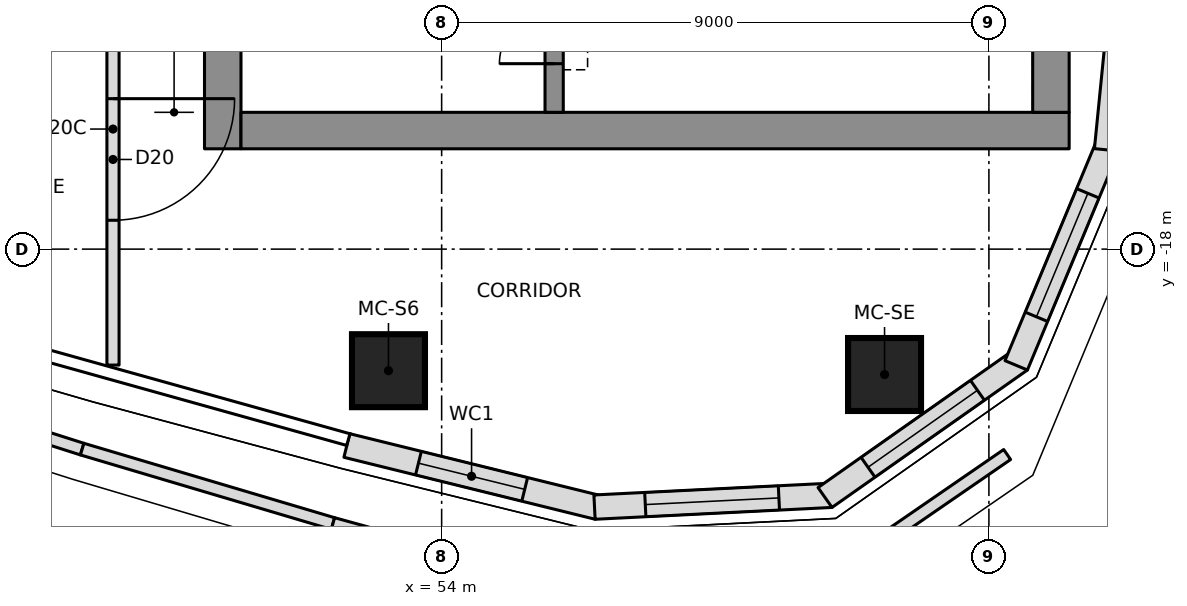
"""IFC4 building model, lengths in metres.
Left out: names, types, materials, properties, quantities, classifications, styles, units other than length and angle.
Written with IfcOpenShell. Run it as: python <this file> out.ifc"""

import sys

from ifc_helpers import new_model, si_unit, direction, frame, frame_2d, origin, origin_2d, place, context, subcontext, project, spatial, polyline, rectangle, outline, extrude, element, fill, save


model = new_model("IFC4")
c1 = context("Model", 3, precision=1e-05, world=origin(), true_north=direction((0.0, 1.0)))
c2 = subcontext(c1, "Body", "Model", "MODEL_VIEW")
j1 = project(units=[si_unit("LENGTHUNIT", "METRE"), si_unit("PLANEANGLEUNIT", "RADIAN")], contexts=[c1])
p1 = place(None, origin())
s1 = spatial("IfcSite", under=j1, at=p1, CompositionType="ELEMENT")
p2 = place(p1, origin())
s2 = spatial("IfcBuilding", under=s1, at=p2, CompositionType="ELEMENT")
p3 = place(p2, frame((0.0, 0.0, 216.2)))
s3 = spatial("IfcBuildingStorey", under=s2, at=p3, CompositionType="ELEMENT", Elevation=216.2)
p4 = place(p3, frame((50.4, -16.35, 0.0), z_axis=(0.0, 0.0, 1.0), x_axis=(0.0, 1.0, 0.0)))
e1 = element("IfcWall", 1, at=p4, inside=s3, PredefinedType="SHEAR", context=c2, shape_type="SweptSolid", body=[
    extrude(rectangle(XDim=9.7, YDim=0.6, at=frame_2d((4.85, 0.0))), origin(), (0.0, 0.0, 1.0), 4.6),
])
p5 = place(p4, frame((2.1, 0.0, 0.0)))
e2 = element("IfcOpeningElement", 2, at=p5, cuts=e1, PredefinedType="OPENING", context=c2, shape_type="SweptSolid", body=[
    extrude(rectangle(XDim=1.1, YDim=2.1, at=frame_2d((0.55, 1.05))), frame((0.0, 0.31, 0.0), z_axis=(0.0, -1.0, 0.0), x_axis=(1.0, 0.0, 0.0)), (0.0, 0.0, 1.0), 0.62),
])
p6 = place(p3, frame((50.7, -16.05, 0.0), z_axis=(0.0, 0.0, 1.0), x_axis=(1.0, 0.0, 0.0)))
e3 = element("IfcWall", 3, at=p6, inside=s3, PredefinedType="SHEAR", context=c2, shape_type="SweptSolid", body=[
    extrude(rectangle(XDim=13.62, YDim=0.6, at=frame_2d((6.81, 0.0))), origin(), (0.0, 0.0, 1.0), 4.6),
])
p7 = place(p3, frame((64.02, -15.75, 0.0), z_axis=(0.0, 0.0, 1.0), x_axis=(0.0, 1.0, 0.0)))
e4 = element("IfcWall", 4, at=p7, inside=s3, PredefinedType="SHEAR", context=c2, shape_type="SweptSolid", body=[
    extrude(rectangle(XDim=8.248, YDim=0.6, at=frame_2d((4.124, 0.0))), origin(), (0.0, 0.0, 1.0), 4.6),
])
p8 = place(p3, frame((55.85, -15.75, 0.0), z_axis=(0.0, 0.0, 1.0), x_axis=(0.0, 1.0, 0.0)))
e5 = element("IfcWall", 5, at=p8, inside=s3, PredefinedType="SHEAR", context=c2, shape_type="SweptSolid", body=[
    extrude(rectangle(XDim=5.4, YDim=0.3, at=frame_2d((2.7, 0.0))), origin(), (0.0, 0.0, 1.0), 4.6),
])
p9 = place(p8, frame((3.6, 0.0, 0.0)))
e6 = element("IfcOpeningElement", 6, at=p9, cuts=e5, PredefinedType="OPENING", context=c2, shape_type="SweptSolid", body=[
    extrude(rectangle(XDim=1.1, YDim=2.1, at=frame_2d((0.55, 1.05))), frame((0.0, 0.16, 0.0), z_axis=(0.0, -1.0, 0.0), x_axis=(1.0, 0.0, 0.0)), (0.0, 0.0, 1.0), 0.32),
])
p10 = place(p8, frame((0.8, 0.0, 0.0)))
e7 = element("IfcOpeningElement", 7, at=p10, cuts=e5, PredefinedType="OPENING", context=c2, shape_type="SweptSolid", body=[
    extrude(rectangle(XDim=0.9, YDim=2.1, at=frame_2d((0.45, 1.05))), frame((0.0, 0.16, 0.0), z_axis=(0.0, -1.0, 0.0), x_axis=(1.0, 0.0, 0.0)), (0.0, 0.0, 1.0), 0.32),
])
for number, where, z_axis, x_axis in (
    (8, (53.125, -20.0, 0.0), (0.0, 0.0, 1.0), (1.0, 0.0, 0.0)),
    (9, (61.284, -20.062, 0.0), (0.0, 0.0, 1.0), (1.0, 0.0, 0.0)),
):
    element("IfcColumn", number, at=place(p3, frame(where, z_axis=z_axis, x_axis=x_axis)), inside=s3, PredefinedType="COLUMN", context=c2, shape_type="SweptSolid", body=[
        extrude(rectangle(XDim=1.2, YDim=1.2, at=origin_2d()), origin(), (0.0, 0.0, 1.0), 4.6),
    ])
p11 = place(p3, frame((52.441, -21.23, 0.0), z_axis=(0.0, 0.0, 1.0), x_axis=(0.970902342456, -0.23947576373, 0.0)))
e10 = element("IfcWall", 10, at=p11, inside=s3, PredefinedType="NOTDEFINED", context=c2, shape_type="SweptSolid", body=[
    extrude(outline(polyline([(0.0, -0.2), (4.255, -0.2), (4.197, 0.2), (0.0, 0.2), (0.0, -0.2)])), origin(), (0.0, 0.0, 1.0), 4.3),
])
p12 = place(p11, frame((1.213, 0.0, 1.8)))
e11 = element("IfcOpeningElement", 11, at=p12, cuts=e10, PredefinedType="OPENING", context=c2, shape_type="SweptSolid", body=[
    extrude(rectangle(XDim=1.8, YDim=1.2, at=frame_2d((0.9, 0.6))), frame((0.0, 0.21, 0.0), z_axis=(0.0, -1.0, 0.0), x_axis=(1.0, 0.0, 0.0)), (0.0, 0.0, 1.0), 0.42),
])
p13 = place(p3, frame((56.543, -22.242, 0.0), z_axis=(0.0, 0.0, 1.0), x_axis=(0.998758875872, 0.049806705046, 0.0)))
e12 = element("IfcWall", 12, at=p13, inside=s3, PredefinedType="NOTDEFINED", context=c2, shape_type="SweptSolid", body=[
    extrude(outline(polyline([(-0.029, -0.2), (3.871, -0.2), (3.756, 0.2), (0.029, 0.2), (-0.029, -0.2)])), origin(), (0.0, 0.0, 1.0), 4.3),
])
p14 = place(p13, frame((0.807, 0.0, 0.6)))
e13 = element("IfcOpeningElement", 13, at=p14, cuts=e12, PredefinedType="OPENING", context=c2, shape_type="SweptSolid", body=[
    extrude(outline(polyline([(0.0, 1.35), (0.084, 1.771), (0.322, 2.128), (0.679, 2.366), (1.1, 2.45), (1.521, 2.366), (1.878, 2.128), (2.116, 1.771), (2.2, 1.35), (2.2, 1.1), (2.116, 0.679), (1.878, 0.322), (1.521, 0.084), (1.1, 0.0), (0.679, 0.084), (0.322, 0.322), (0.084, 0.679), (0.0, 1.1), (0.0, 1.35)])), frame((0.0, 0.21, 0.0), z_axis=(0.0, -1.0, 0.0), x_axis=(1.0, 0.0, 0.0)), (0.0, 0.0, 1.0), 0.42),
])
p15 = place(p3, frame((60.352, -22.052, 0.0), z_axis=(0.0, 0.0, 1.0), x_axis=(0.817942545532, 0.575299915009, 0.0)))
e14 = element("IfcWall", 14, at=p15, inside=s3, PredefinedType="NOTDEFINED", context=c2, shape_type="SweptSolid", body=[
    extrude(outline(polyline([(-0.058, -0.2), (3.871, -0.2), (3.756, 0.2), (0.058, 0.2), (-0.058, -0.2)])), origin(), (0.0, 0.0, 1.0), 4.3),
])
p16 = place(p15, frame((0.807, 0.0, 0.6)))
e15 = element("IfcOpeningElement", 15, at=p16, cuts=e14, PredefinedType="OPENING", context=c2, shape_type="SweptSolid", body=[
    extrude(outline(polyline([(0.0, 1.35), (0.084, 1.771), (0.322, 2.128), (0.679, 2.366), (1.1, 2.45), (1.521, 2.366), (1.878, 2.128), (2.116, 1.771), (2.2, 1.35), (2.2, 1.1), (2.116, 0.679), (1.878, 0.322), (1.521, 0.084), (1.1, 0.0), (0.679, 0.084), (0.322, 0.322), (0.084, 0.679), (0.0, 1.1), (0.0, 1.35)])), frame((0.0, 0.21, 0.0), z_axis=(0.0, -1.0, 0.0), x_axis=(1.0, 0.0, 0.0)), (0.0, 0.0, 1.0), 0.42),
])
p17 = place(p3, frame((63.471, -19.858, 0.0), z_axis=(0.0, 0.0, 1.0), x_axis=(0.3844335483, 0.923152667191, 0.0)))
e16 = element("IfcWall", 16, at=p17, inside=s3, PredefinedType="NOTDEFINED", context=c2, shape_type="SweptSolid", body=[
    extrude(outline(polyline([(-0.058, -0.2), (3.843, -0.2), (3.784, 0.2), (0.058, 0.2), (-0.058, -0.2)])), origin(), (0.0, 0.0, 1.0), 4.3),
])
p18 = place(p17, frame((0.807, 0.0, 0.6)))
e17 = element("IfcOpeningElement", 17, at=p18, cuts=e16, PredefinedType="OPENING", context=c2, shape_type="SweptSolid", body=[
    extrude(outline(polyline([(0.0, 1.35), (0.084, 1.771), (0.322, 2.128), (0.679, 2.366), (1.1, 2.45), (1.521, 2.366), (1.878, 2.128), (2.116, 1.771), (2.2, 1.35), (2.2, 1.1), (2.116, 0.679), (1.878, 0.322), (1.521, 0.084), (1.1, 0.0), (0.679, 0.084), (0.322, 0.322), (0.084, 0.679), (0.0, 1.1), (0.0, 1.35)])), frame((0.0, 0.21, 0.0), z_axis=(0.0, -1.0, 0.0), x_axis=(1.0, 0.0, 0.0)), (0.0, 0.0, 1.0), 0.42),
])
p19 = place(p3, frame((64.938, -16.337, 0.0), z_axis=(0.0, 0.0, 1.0), x_axis=(0.098718218066, 0.995115427185, 0.0)))
e18 = element("IfcWall", 18, at=p19, inside=s3, PredefinedType="NOTDEFINED", context=c2, shape_type="SweptSolid", body=[
    extrude(outline(polyline([(-0.03, -0.2), (4.096, -0.2), (4.09, 0.2), (0.03, 0.2), (-0.03, -0.2)])), origin(), (0.0, 0.0, 1.0), 4.3),
])
p20 = place(p19, frame((1.976, 0.0, 1.8)))
e19 = element("IfcOpeningElement", 19, at=p20, cuts=e18, PredefinedType="OPENING", context=c2, shape_type="SweptSolid", body=[
    extrude(rectangle(XDim=1.8, YDim=1.2, at=frame_2d((0.9, 0.6))), frame((0.0, 0.21, 0.0), z_axis=(0.0, -1.0, 0.0), x_axis=(1.0, 0.0, 0.0)), (0.0, 0.0, 1.0), 0.42),
])
p21 = place(p3, frame((43.988, -19.982, 0.0), z_axis=(0.0, 0.0, 1.0), x_axis=(0.952727369543, -0.303826528341, 0.0)))
e20 = element("IfcWall", 20, at=p21, inside=s3, PredefinedType="PARAPET", context=c2, shape_type="SweptSolid", body=[
    extrude(rectangle(XDim=4.303, YDim=0.2, at=frame_2d((2.151, 0.0))), origin(), (0.0, 0.0, 1.0), 1.1),
])
p22 = place(p3, frame((48.088, -21.289, 0.0), z_axis=(0.0, 0.0, 1.0), x_axis=(0.958673228505, -0.284509474266, 0.0)))
e21 = element("IfcWall", 21, at=p22, inside=s3, PredefinedType="PARAPET", context=c2, shape_type="SweptSolid", body=[
    extrude(rectangle(XDim=4.302, YDim=0.2, at=frame_2d((2.151, 0.0))), origin(), (0.0, 0.0, 1.0), 1.1),
])
p23 = place(p3, frame((52.213, -22.513, 0.0), z_axis=(0.0, 0.0, 1.0), x_axis=(0.964196245913, -0.265189742197, 0.0)))
e22 = element("IfcWall", 22, at=p23, inside=s3, PredefinedType="PARAPET", context=c2, shape_type="SweptSolid", body=[
    extrude(rectangle(XDim=4.265, YDim=0.2, at=frame_2d((2.133, 0.0))), origin(), (0.0, 0.0, 1.0), 1.1),
])
p24 = place(p3, frame((60.167, -23.534, 0.0), z_axis=(0.0, 0.0, 1.0), x_axis=(0.823824636329, 0.566844748213, 0.0)))
e23 = element("IfcWall", 23, at=p24, inside=s3, PredefinedType="PARAPET", context=c2, shape_type="SweptSolid", body=[
    extrude(rectangle(XDim=3.804, YDim=0.2, at=frame_2d((1.902, 0.0))), origin(), (0.0, 0.0, 1.0), 1.1),
])
p25 = place(p3, frame((48.595, -12.144, 0.0), z_axis=(0.0, 0.0, 1.0), x_axis=(0.0, -1.0, 0.0)))
e24 = element("IfcWall", 24, at=p25, inside=s3, PredefinedType="PARTITIONING", context=c2, shape_type="SweptSolid", body=[
    extrude(rectangle(XDim=7.763, YDim=0.2, at=frame_2d((3.882, 0.0))), origin(), (0.0, 0.0, 1.0), 4.3),
])
p26 = place(p25, frame((3.382, 0.0, 0.0)))
e25 = element("IfcOpeningElement", 25, at=p26, cuts=e24, PredefinedType="OPENING", context=c2, shape_type="SweptSolid", body=[
    extrude(rectangle(XDim=2.0, YDim=2.4, at=frame_2d((1.0, 1.2))), frame((0.0, 0.11, 0.0), z_axis=(0.0, -1.0, 0.0), x_axis=(1.0, 0.0, 0.0)), (0.0, 0.0, 1.0), 0.22),
])
p27 = place(p12, origin())
e26 = element("IfcWindow", 26, at=p27, inside=s3, PartitioningType="SINGLE_PANEL", PredefinedType="WINDOW", context=c2, shape_type="SweptSolid", body=[
    extrude(rectangle(XDim=1.8, YDim=1.2, at=frame_2d((0.9, 0.6))), frame((0.0, 0.17, 0.0), z_axis=(0.0, -1.0, 0.0), x_axis=(1.0, 0.0, 0.0)), (0.0, 0.0, 1.0), 0.06),
])
fill(e11, e26)
p28 = place(p14, origin())
e27 = element("IfcWindow", 27, at=p28, inside=s3, PartitioningType="SINGLE_PANEL", PredefinedType="WINDOW", context=c2, shape_type="SweptSolid", body=[
    extrude(outline(polyline([(0.0, 1.35), (0.084, 1.771), (0.322, 2.128), (0.679, 2.366), (1.1, 2.45), (1.521, 2.366), (1.878, 2.128), (2.116, 1.771), (2.2, 1.35), (2.2, 1.1), (2.116, 0.679), (1.878, 0.322), (1.521, 0.084), (1.1, 0.0), (0.679, 0.084), (0.322, 0.322), (0.084, 0.679), (0.0, 1.1), (0.0, 1.35)])), frame((0.0, 0.17, 0.0), z_axis=(0.0, -1.0, 0.0), x_axis=(1.0, 0.0, 0.0)), (0.0, 0.0, 1.0), 0.06),
])
fill(e13, e27)
p29 = place(p16, origin())
e28 = element("IfcWindow", 28, at=p29, inside=s3, PartitioningType="SINGLE_PANEL", PredefinedType="WINDOW", context=c2, shape_type="SweptSolid", body=[
    extrude(outline(polyline([(0.0, 1.35), (0.084, 1.771), (0.322, 2.128), (0.679, 2.366), (1.1, 2.45), (1.521, 2.366), (1.878, 2.128), (2.116, 1.771), (2.2, 1.35), (2.2, 1.1), (2.116, 0.679), (1.878, 0.322), (1.521, 0.084), (1.1, 0.0), (0.679, 0.084), (0.322, 0.322), (0.084, 0.679), (0.0, 1.1), (0.0, 1.35)])), frame((0.0, 0.17, 0.0), z_axis=(0.0, -1.0, 0.0), x_axis=(1.0, 0.0, 0.0)), (0.0, 0.0, 1.0), 0.06),
])
fill(e15, e28)
p30 = place(p18, origin())
e29 = element("IfcWindow", 29, at=p30, inside=s3, PartitioningType="SINGLE_PANEL", PredefinedType="WINDOW", context=c2, shape_type="SweptSolid", body=[
    extrude(outline(polyline([(0.0, 1.35), (0.084, 1.771), (0.322, 2.128), (0.679, 2.366), (1.1, 2.45), (1.521, 2.366), (1.878, 2.128), (2.116, 1.771), (2.2, 1.35), (2.2, 1.1), (2.116, 0.679), (1.878, 0.322), (1.521, 0.084), (1.1, 0.0), (0.679, 0.084), (0.322, 0.322), (0.084, 0.679), (0.0, 1.1), (0.0, 1.35)])), frame((0.0, 0.17, 0.0), z_axis=(0.0, -1.0, 0.0), x_axis=(1.0, 0.0, 0.0)), (0.0, 0.0, 1.0), 0.06),
])
fill(e17, e29)
p31 = place(p26, origin())
e30 = element("IfcDoor", 30, at=p31, inside=s3, OperationType="DOUBLE_DOOR_SINGLE_SWING", PredefinedType="DOOR", context=c2, shape_type="SweptSolid", body=[
    extrude(rectangle(XDim=2.0, YDim=2.4, at=frame_2d((1.0, 1.2))), frame((0.0, 0.025, 0.0), z_axis=(0.0, -1.0, 0.0), x_axis=(1.0, 0.0, 0.0)), (0.0, 0.0, 1.0), 0.05),
])
fill(e25, e30)
p32 = place(p10, origin())
e31 = element("IfcDoor", 31, at=p32, inside=s3, OperationType="SINGLE_SWING_LEFT", PredefinedType="DOOR", context=c2, shape_type="SweptSolid", body=[
    extrude(rectangle(XDim=0.9, YDim=2.1, at=frame_2d((0.45, 1.05))), frame((0.0, 0.025, 0.0), z_axis=(0.0, -1.0, 0.0), x_axis=(1.0, 0.0, 0.0)), (0.0, 0.0, 1.0), 0.05),
])
fill(e7, e31)
save(model, sys.argv[1])
